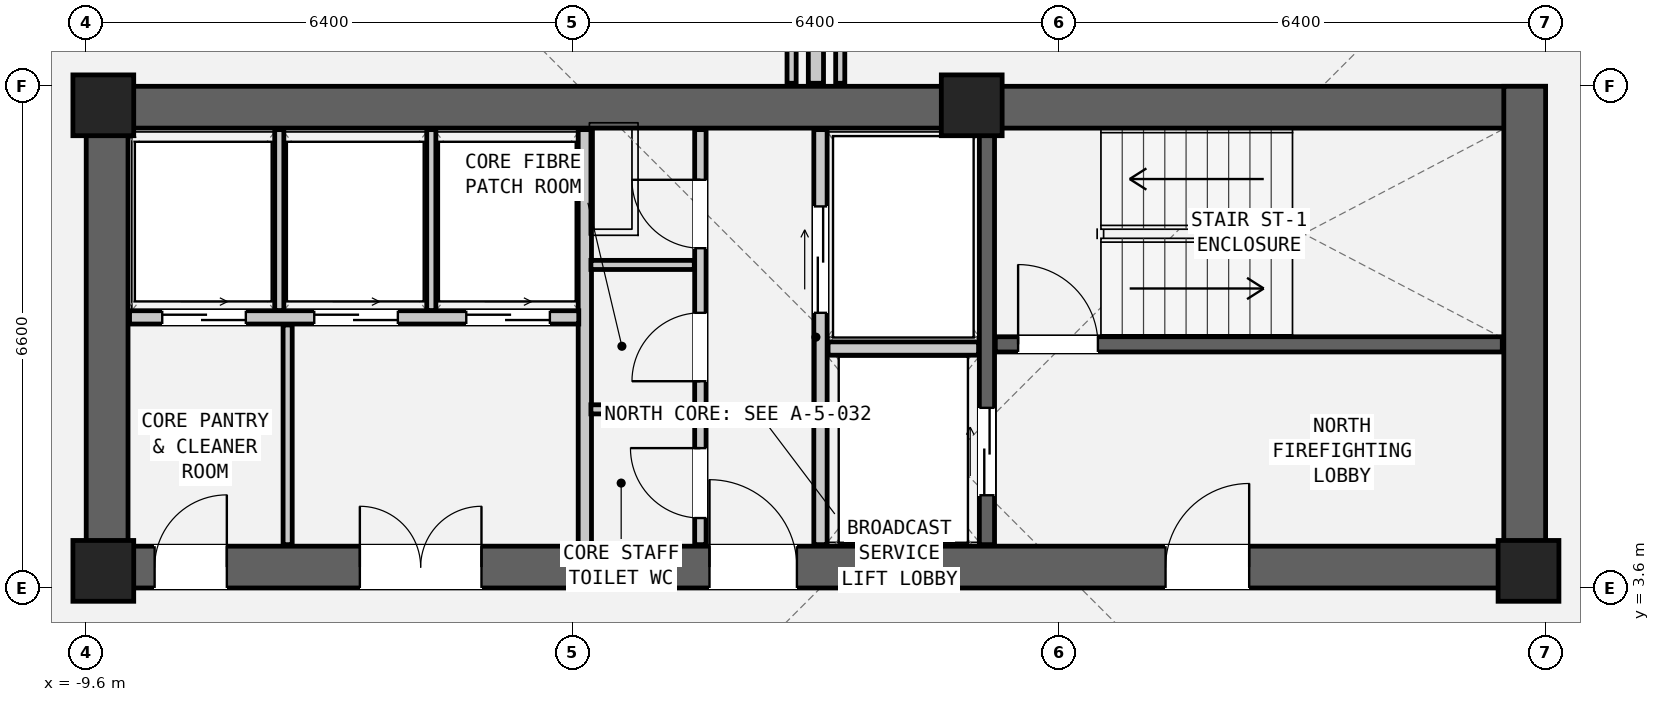
"""IFC4 building model, lengths in metres.
Left out: names, types, materials, properties, quantities, classifications, styles, units other than length and angle.
Written with IfcOpenShell. Run it as: python <this file> out.ifc"""

import sys

from ifc_helpers import new_model, si_unit, direction, frame, frame_2d, origin, origin_2d, place, context, subcontext, project, spatial, rectangle, extrude, element, fill, save


model = new_model("IFC4")
c1 = context("Model", 3, precision=1e-05, world=origin(), true_north=direction((0.0, 1.0)))
c2 = subcontext(c1, "Body", "Model", "MODEL_VIEW")
j1 = project(units=[si_unit("LENGTHUNIT", "METRE"), si_unit("PLANEANGLEUNIT", "RADIAN")], contexts=[c1])
p1 = place(None, origin())
s1 = spatial("IfcSite", under=j1, at=p1, CompositionType="ELEMENT")
p2 = place(p1, origin())
s2 = spatial("IfcBuilding", under=s1, at=p2, CompositionType="ELEMENT")
p3 = place(p2, frame((0.0, 0.0, 101.25)))
s3 = spatial("IfcBuildingStorey", under=s2, at=p3, CompositionType="ELEMENT", Elevation=101.25)
p4 = place(p3, frame((-9.6, 9.925, 0.0), z_axis=(0.0, 0.0, 1.0), x_axis=(1.0, 0.0, 0.0)))
e1 = element("IfcWall", 1, at=p4, inside=s3, PredefinedType="SHEAR", context=c2, shape_type="SweptSolid", body=[
    extrude(rectangle(XDim=19.2, YDim=0.55, at=frame_2d((9.6, 0.0))), origin(), (0.0, 0.0, 1.0), 3.6),
])
p5 = place(p3, frame((-9.6, 3.875, 0.0), z_axis=(0.0, 0.0, 1.0), x_axis=(1.0, 0.0, 0.0)))
e2 = element("IfcWall", 2, at=p5, inside=s3, PredefinedType="SHEAR", context=c2, shape_type="SweptSolid", body=[
    extrude(rectangle(XDim=19.2, YDim=0.55, at=frame_2d((9.6, 0.0))), origin(), (0.0, 0.0, 1.0), 3.6),
])
p6 = place(p5, frame((14.2, 0.0, 0.0)))
e3 = element("IfcOpeningElement", 3, at=p6, cuts=e2, PredefinedType="OPENING", context=c2, shape_type="SweptSolid", body=[
    extrude(rectangle(XDim=1.1, YDim=2.08, at=frame_2d((0.55, 1.04))), frame((0.0, 0.287, 0.0), z_axis=(0.0, -1.0, 0.0), x_axis=(1.0, 0.0, 0.0)), (0.0, 0.0, 1.0), 0.574),
])
p7 = place(p5, frame((8.2, 0.0, 0.0)))
e4 = element("IfcOpeningElement", 4, at=p7, cuts=e2, PredefinedType="OPENING", context=c2, shape_type="SweptSolid", body=[
    extrude(rectangle(XDim=1.15, YDim=2.1, at=frame_2d((0.575, 1.05))), frame((0.0, 0.287, 0.0), z_axis=(0.0, -1.0, 0.0), x_axis=(1.0, 0.0, 0.0)), (0.0, 0.0, 1.0), 0.574),
])
p8 = place(p5, frame((0.9, 0.0, 0.0)))
e5 = element("IfcOpeningElement", 5, at=p8, cuts=e2, PredefinedType="OPENING", context=c2, shape_type="SweptSolid", body=[
    extrude(rectangle(XDim=0.95, YDim=2.1, at=frame_2d((0.475, 1.05))), frame((0.0, 0.287, 0.0), z_axis=(0.0, -1.0, 0.0), x_axis=(1.0, 0.0, 0.0)), (0.0, 0.0, 1.0), 0.574),
])
p9 = place(p5, frame((3.6, 0.0, 0.0)))
e6 = element("IfcOpeningElement", 6, at=p9, cuts=e2, PredefinedType="OPENING", context=c2, shape_type="SweptSolid", body=[
    extrude(rectangle(XDim=1.6, YDim=2.12, at=frame_2d((0.8, 1.06))), frame((0.0, 0.287, 0.0), z_axis=(0.0, -1.0, 0.0), x_axis=(1.0, 0.0, 0.0)), (0.0, 0.0, 1.0), 0.574),
])
for number, where, z_axis, x_axis in (
    (7, (-9.325, 3.6, 0.0), (0.0, 0.0, 1.0), (0.0, 1.0, 0.0)),
    (8, (9.325, 3.6, 0.0), (0.0, 0.0, 1.0), (0.0, 1.0, 0.0)),
):
    element("IfcWall", number, at=place(p3, frame(where, z_axis=z_axis, x_axis=x_axis)), inside=s3, PredefinedType="SHEAR", context=c2, shape_type="SweptSolid", body=[
        extrude(rectangle(XDim=6.6, YDim=0.55, at=frame_2d((3.3, 0.0))), origin(), (0.0, 0.0, 1.0), 3.6),
    ])
for number, where, z_axis, x_axis in (
    (9, (-9.375, 9.95, 0.0), (0.0, 0.0, 1.0), (1.0, 0.0, 0.0)),
    (10, (2.05, 9.95, 0.0), (0.0, 0.0, 1.0), (1.0, 0.0, 0.0)),
    (11, (-9.375, 3.825, 0.0), (0.0, 0.0, 1.0), (1.0, 0.0, 0.0)),
    (12, (9.375, 3.825, 0.0), (0.0, 0.0, 1.0), (1.0, 0.0, 0.0)),
):
    element("IfcColumn", number, at=place(p3, frame(where, z_axis=z_axis, x_axis=x_axis)), inside=s3, PredefinedType="COLUMN", context=c2, shape_type="SweptSolid", body=[
        extrude(rectangle(XDim=0.8, YDim=0.8, at=origin_2d()), origin(), (0.0, 0.0, 1.0), 3.6),
    ])
p10 = place(p3, frame((2.36, 6.805, 0.0), z_axis=(0.0, 0.0, 1.0), x_axis=(1.0, 0.0, 0.0)))
e13 = element("IfcWall", 13, at=p10, inside=s3, PredefinedType="SHEAR", context=c2, shape_type="SweptSolid", body=[
    extrude(rectangle(XDim=6.67, YDim=0.2, at=frame_2d((3.335, 0.0))), origin(), (0.0, 0.0, 1.0), 3.22),
])
p11 = place(p10, frame((0.3, 0.0, 0.0)))
e14 = element("IfcOpeningElement", 14, at=p11, cuts=e13, PredefinedType="OPENING", context=c2, shape_type="SweptSolid", body=[
    extrude(rectangle(XDim=1.05, YDim=2.08, at=frame_2d((0.525, 1.04))), frame((0.0, 0.112, 0.0), z_axis=(0.0, -1.0, 0.0), x_axis=(1.0, 0.0, 0.0)), (0.0, 0.0, 1.0), 0.224),
])
p12 = place(p3, frame((2.25, 4.17, 0.0), z_axis=(0.0, 0.0, 1.0), x_axis=(0.0, 1.0, 0.0)))
e15 = element("IfcWall", 15, at=p12, inside=s3, PredefinedType="SHEAR", context=c2, shape_type="SweptSolid", body=[
    extrude(rectangle(XDim=5.46, YDim=0.2, at=frame_2d((2.73, 0.0))), origin(), (0.0, 0.0, 1.0), 3.22),
])
p13 = place(p12, frame((0.65, 0.0, 0.0)))
e16 = element("IfcOpeningElement", 16, at=p13, cuts=e15, PredefinedType="OPENING", context=c2, shape_type="SweptSolid", body=[
    extrude(rectangle(XDim=1.15, YDim=2.08, at=frame_2d((0.575, 1.04))), frame((0.0, 0.112, 0.0), z_axis=(0.0, -1.0, 0.0), x_axis=(1.0, 0.0, 0.0)), (0.0, 0.0, 1.0), 0.224),
])
p14 = place(p3, frame((0.06, 4.17, 0.0), z_axis=(0.0, 0.0, 1.0), x_axis=(0.0, 1.0, 0.0)))
e17 = element("IfcWall", 17, at=p14, inside=s3, PredefinedType="PARTITIONING", context=c2, shape_type="SweptSolid", body=[
    extrude(rectangle(XDim=5.46, YDim=0.175, at=frame_2d((2.73, 0.0))), origin(), (0.0, 0.0, 1.0), 3.22),
])
p15 = place(p14, frame((3.05, 0.0, 0.0)))
e18 = element("IfcOpeningElement", 18, at=p15, cuts=e17, PredefinedType="OPENING", context=c2, shape_type="SweptSolid", body=[
    extrude(rectangle(XDim=1.4, YDim=2.12, at=frame_2d((0.7, 1.06))), frame((0.0, 0.1, 0.0), z_axis=(0.0, -1.0, 0.0), x_axis=(1.0, 0.0, 0.0)), (0.0, 0.0, 1.0), 0.199),
])
p16 = place(p3, frame((0.16, 6.75, 0.0), z_axis=(0.0, 0.0, 1.0), x_axis=(1.0, 0.0, 0.0)))
e19 = element("IfcWall", 19, at=p16, inside=s3, PredefinedType="PARTITIONING", context=c2, shape_type="SweptSolid", body=[
    extrude(rectangle(XDim=1.98, YDim=0.175, at=frame_2d((0.99, 0.0))), origin(), (0.0, 0.0, 1.0), 3.22),
])
p17 = place(p3, frame((-3.04, 4.17, 0.0), z_axis=(0.0, 0.0, 1.0), x_axis=(0.0, 1.0, 0.0)))
e20 = element("IfcWall", 20, at=p17, inside=s3, PredefinedType="PARTITIONING", context=c2, shape_type="SweptSolid", body=[
    extrude(rectangle(XDim=5.46, YDim=0.175, at=frame_2d((2.73, 0.0))), origin(), (0.0, 0.0, 1.0), 3.22),
])
p18 = place(p3, frame((-1.52, 4.17, 0.0), z_axis=(0.0, 0.0, 1.0), x_axis=(0.0, 1.0, 0.0)))
e21 = element("IfcWall", 21, at=p18, inside=s3, PredefinedType="PARTITIONING", context=c2, shape_type="SweptSolid", body=[
    extrude(rectangle(XDim=5.46, YDim=0.15, at=frame_2d((2.73, 0.0))), origin(), (0.0, 0.0, 1.0), 3.22),
])
p19 = place(p18, frame((3.9, 0.0, 0.0)))
e22 = element("IfcOpeningElement", 22, at=p19, cuts=e21, PredefinedType="OPENING", context=c2, shape_type="SweptSolid", body=[
    extrude(rectangle(XDim=0.9, YDim=2.05, at=frame_2d((0.45, 1.025))), frame((0.0, 0.087, 0.0), z_axis=(0.0, -1.0, 0.0), x_axis=(1.0, 0.0, 0.0)), (0.0, 0.0, 1.0), 0.174),
])
p20 = place(p18, frame((2.15, 0.0, 0.0)))
e23 = element("IfcOpeningElement", 23, at=p20, cuts=e21, PredefinedType="OPENING", context=c2, shape_type="SweptSolid", body=[
    extrude(rectangle(XDim=0.9, YDim=2.05, at=frame_2d((0.45, 1.025))), frame((0.0, 0.087, 0.0), z_axis=(0.0, -1.0, 0.0), x_axis=(1.0, 0.0, 0.0)), (0.0, 0.0, 1.0), 0.174),
])
p21 = place(p18, frame((0.35, 0.0, 0.0)))
e24 = element("IfcOpeningElement", 24, at=p21, cuts=e21, PredefinedType="OPENING", context=c2, shape_type="SweptSolid", body=[
    extrude(rectangle(XDim=0.92, YDim=2.1, at=frame_2d((0.46, 1.05))), frame((0.0, 0.087, 0.0), z_axis=(0.0, -1.0, 0.0), x_axis=(1.0, 0.0, 0.0)), (0.0, 0.0, 1.0), 0.174),
])
for number, where, z_axis, x_axis in (
    (25, (-2.96, 5.95, 0.0), (0.0, 0.0, 1.0), (1.0, 0.0, 0.0)),
    (26, (-2.96, 7.85, 0.0), (0.0, 0.0, 1.0), (1.0, 0.0, 0.0)),
):
    element("IfcWall", number, at=place(p3, frame(where, z_axis=z_axis, x_axis=x_axis)), inside=s3, PredefinedType="PARTITIONING", context=c2, shape_type="SweptSolid", body=[
        extrude(rectangle(XDim=1.36, YDim=0.12, at=frame_2d((0.68, 0.0))), origin(), (0.0, 0.0, 1.0), 3.22),
    ])
p22 = place(p3, frame((-9.03, 7.16, 0.0), z_axis=(0.0, 0.0, 1.0), x_axis=(1.0, 0.0, 0.0)))
e27 = element("IfcWall", 27, at=p22, inside=s3, PredefinedType="PARTITIONING", context=c2, shape_type="SweptSolid", body=[
    extrude(rectangle(XDim=5.91, YDim=0.175, at=frame_2d((2.955, 0.0))), origin(), (0.0, 0.0, 1.0), 3.22),
])
p23 = place(p22, frame((0.43, 0.0, 0.0)))
e28 = element("IfcOpeningElement", 28, at=p23, cuts=e27, PredefinedType="OPENING", context=c2, shape_type="SweptSolid", body=[
    extrude(rectangle(XDim=1.1, YDim=2.06, at=frame_2d((0.55, 1.03))), frame((0.0, 0.1, 0.0), z_axis=(0.0, -1.0, 0.0), x_axis=(1.0, 0.0, 0.0)), (0.0, 0.0, 1.0), 0.199),
])
p24 = place(p22, frame((2.43, 0.0, 0.0)))
e29 = element("IfcOpeningElement", 29, at=p24, cuts=e27, PredefinedType="OPENING", context=c2, shape_type="SweptSolid", body=[
    extrude(rectangle(XDim=1.1, YDim=2.06, at=frame_2d((0.55, 1.03))), frame((0.0, 0.1, 0.0), z_axis=(0.0, -1.0, 0.0), x_axis=(1.0, 0.0, 0.0)), (0.0, 0.0, 1.0), 0.199),
])
p25 = place(p22, frame((4.43, 0.0, 0.0)))
e30 = element("IfcOpeningElement", 30, at=p25, cuts=e27, PredefinedType="OPENING", context=c2, shape_type="SweptSolid", body=[
    extrude(rectangle(XDim=1.1, YDim=2.06, at=frame_2d((0.55, 1.03))), frame((0.0, 0.1, 0.0), z_axis=(0.0, -1.0, 0.0), x_axis=(1.0, 0.0, 0.0)), (0.0, 0.0, 1.0), 0.199),
])
for number, where, z_axis, x_axis in (
    (31, (-7.06, 7.25, 0.0), (0.0, 0.0, 1.0), (0.0, 1.0, 0.0)),
    (32, (-5.06, 7.25, 0.0), (0.0, 0.0, 1.0), (0.0, 1.0, 0.0)),
):
    element("IfcWall", number, at=place(p3, frame(where, z_axis=z_axis, x_axis=x_axis)), inside=s3, PredefinedType="PARTITIONING", context=c2, shape_type="SweptSolid", body=[
        extrude(rectangle(XDim=2.38, YDim=0.12, at=frame_2d((1.19, 0.0))), origin(), (0.0, 0.0, 1.0), 3.22),
    ])
p26 = place(p3, frame((-6.95, 4.17, 0.0), z_axis=(0.0, 0.0, 1.0), x_axis=(0.0, 1.0, 0.0)))
e33 = element("IfcWall", 33, at=p26, inside=s3, PredefinedType="PARTITIONING", context=c2, shape_type="SweptSolid", body=[
    extrude(rectangle(XDim=2.89, YDim=0.12, at=frame_2d((1.445, 0.0))), origin(), (0.0, 0.0, 1.0), 3.22),
])
p27 = place(p3, frame((0.0, 10.24, 0.0), z_axis=(0.0, 0.0, 1.0), x_axis=(0.0, 1.0, 0.0)))
e34 = element("IfcWall", 34, at=p27, inside=s3, PredefinedType="PARTITIONING", context=c2, shape_type="SweptSolid", body=[
    extrude(rectangle(XDim=14.55, YDim=0.2, at=frame_2d((7.275, 0.0))), origin(), (0.0, 0.0, 1.0), 2.741),
])
for number, where, z_axis, x_axis in (
    (35, (-0.32, 10.24, 0.0), (0.0, 0.0, 1.0), (0.0, 1.0, 0.0)),
    (36, (0.32, 10.24, 0.0), (0.0, 0.0, 1.0), (0.0, 1.0, 0.0)),
):
    element("IfcWall", number, at=place(p3, frame(where, z_axis=z_axis, x_axis=x_axis)), inside=s3, PredefinedType="PARTITIONING", context=c2, shape_type="SweptSolid", body=[
        extrude(rectangle(XDim=2.36, YDim=0.12, at=frame_2d((1.18, 0.0))), origin(), (0.0, 0.0, 1.0), 2.741),
    ])
p28 = place(p11, origin())
e37 = element("IfcDoor", 37, at=p28, inside=s3, OperationType="SINGLE_SWING_LEFT", PredefinedType="DOOR", context=c2, shape_type="SweptSolid", body=[
    extrude(rectangle(XDim=1.05, YDim=2.08, at=frame_2d((0.525, 1.04))), frame((0.0, 0.025, 0.0), z_axis=(0.0, -1.0, 0.0), x_axis=(1.0, 0.0, 0.0)), (0.0, 0.0, 1.0), 0.05),
])
fill(e14, e37)
p29 = place(p6, origin())
e38 = element("IfcDoor", 38, at=p29, inside=s3, OperationType="SINGLE_SWING_RIGHT", PredefinedType="DOOR", context=c2, shape_type="SweptSolid", body=[
    extrude(rectangle(XDim=1.1, YDim=2.08, at=frame_2d((0.55, 1.04))), frame((0.0, 0.025, 0.0), z_axis=(0.0, -1.0, 0.0), x_axis=(1.0, 0.0, 0.0)), (0.0, 0.0, 1.0), 0.05),
])
fill(e3, e38)
p30 = place(p13, origin())
e39 = element("IfcDoor", 39, at=p30, inside=s3, OperationType="DOUBLE_DOOR_SLIDING", PredefinedType="DOOR", context=c2, shape_type="SweptSolid", body=[
    extrude(rectangle(XDim=1.15, YDim=2.08, at=frame_2d((0.575, 1.04))), frame((0.0, 0.025, 0.0), z_axis=(0.0, -1.0, 0.0), x_axis=(1.0, 0.0, 0.0)), (0.0, 0.0, 1.0), 0.05),
])
fill(e16, e39)
p31 = place(p15, origin())
e40 = element("IfcDoor", 40, at=p31, inside=s3, OperationType="DOUBLE_DOOR_SLIDING", PredefinedType="DOOR", context=c2, shape_type="SweptSolid", body=[
    extrude(rectangle(XDim=1.4, YDim=2.12, at=frame_2d((0.7, 1.06))), frame((0.0, 0.025, 0.0), z_axis=(0.0, -1.0, 0.0), x_axis=(1.0, 0.0, 0.0)), (0.0, 0.0, 1.0), 0.05),
])
fill(e18, e40)
p32 = place(p7, origin())
e41 = element("IfcDoor", 41, at=p32, inside=s3, OperationType="SINGLE_SWING_LEFT", PredefinedType="DOOR", context=c2, shape_type="SweptSolid", body=[
    extrude(rectangle(XDim=1.15, YDim=2.1, at=frame_2d((0.575, 1.05))), frame((0.0, 0.025, 0.0), z_axis=(0.0, -1.0, 0.0), x_axis=(1.0, 0.0, 0.0)), (0.0, 0.0, 1.0), 0.05),
])
fill(e4, e41)
p33 = place(p19, origin())
e42 = element("IfcDoor", 42, at=p33, inside=s3, OperationType="SINGLE_SWING_RIGHT", PredefinedType="DOOR", context=c2, shape_type="SweptSolid", body=[
    extrude(rectangle(XDim=0.9, YDim=2.05, at=frame_2d((0.45, 1.025))), frame((0.0, 0.025, 0.0), z_axis=(0.0, -1.0, 0.0), x_axis=(1.0, 0.0, 0.0)), (0.0, 0.0, 1.0), 0.05),
])
fill(e22, e42)
p34 = place(p20, origin())
e43 = element("IfcDoor", 43, at=p34, inside=s3, OperationType="SINGLE_SWING_LEFT", PredefinedType="DOOR", context=c2, shape_type="SweptSolid", body=[
    extrude(rectangle(XDim=0.9, YDim=2.05, at=frame_2d((0.45, 1.025))), frame((0.0, 0.025, 0.0), z_axis=(0.0, -1.0, 0.0), x_axis=(1.0, 0.0, 0.0)), (0.0, 0.0, 1.0), 0.05),
])
fill(e23, e43)
p35 = place(p21, origin())
e44 = element("IfcDoor", 44, at=p35, inside=s3, OperationType="SINGLE_SWING_RIGHT", PredefinedType="DOOR", context=c2, shape_type="SweptSolid", body=[
    extrude(rectangle(XDim=0.92, YDim=2.1, at=frame_2d((0.46, 1.05))), frame((0.0, 0.025, 0.0), z_axis=(0.0, -1.0, 0.0), x_axis=(1.0, 0.0, 0.0)), (0.0, 0.0, 1.0), 0.05),
])
fill(e24, e44)
p36 = place(p23, origin())
e45 = element("IfcDoor", 45, at=p36, inside=s3, OperationType="DOUBLE_DOOR_SLIDING", PredefinedType="DOOR", context=c2, shape_type="SweptSolid", body=[
    extrude(rectangle(XDim=1.1, YDim=2.06, at=frame_2d((0.55, 1.03))), frame((0.0, 0.025, 0.0), z_axis=(0.0, -1.0, 0.0), x_axis=(1.0, 0.0, 0.0)), (0.0, 0.0, 1.0), 0.05),
])
fill(e28, e45)
p37 = place(p24, origin())
e46 = element("IfcDoor", 46, at=p37, inside=s3, OperationType="DOUBLE_DOOR_SLIDING", PredefinedType="DOOR", context=c2, shape_type="SweptSolid", body=[
    extrude(rectangle(XDim=1.1, YDim=2.06, at=frame_2d((0.55, 1.03))), frame((0.0, 0.025, 0.0), z_axis=(0.0, -1.0, 0.0), x_axis=(1.0, 0.0, 0.0)), (0.0, 0.0, 1.0), 0.05),
])
fill(e29, e46)
p38 = place(p25, origin())
e47 = element("IfcDoor", 47, at=p38, inside=s3, OperationType="DOUBLE_DOOR_SLIDING", PredefinedType="DOOR", context=c2, shape_type="SweptSolid", body=[
    extrude(rectangle(XDim=1.1, YDim=2.06, at=frame_2d((0.55, 1.03))), frame((0.0, 0.025, 0.0), z_axis=(0.0, -1.0, 0.0), x_axis=(1.0, 0.0, 0.0)), (0.0, 0.0, 1.0), 0.05),
])
fill(e30, e47)
p39 = place(p8, origin())
e48 = element("IfcDoor", 48, at=p39, inside=s3, OperationType="SINGLE_SWING_RIGHT", PredefinedType="DOOR", context=c2, shape_type="SweptSolid", body=[
    extrude(rectangle(XDim=0.95, YDim=2.1, at=frame_2d((0.475, 1.05))), frame((0.0, 0.025, 0.0), z_axis=(0.0, -1.0, 0.0), x_axis=(1.0, 0.0, 0.0)), (0.0, 0.0, 1.0), 0.05),
])
fill(e5, e48)
p40 = place(p9, origin())
e49 = element("IfcDoor", 49, at=p40, inside=s3, OperationType="DOUBLE_DOOR_SINGLE_SWING", PredefinedType="DOOR", context=c2, shape_type="SweptSolid", body=[
    extrude(rectangle(XDim=1.6, YDim=2.12, at=frame_2d((0.8, 1.06))), frame((0.0, 0.025, 0.0), z_axis=(0.0, -1.0, 0.0), x_axis=(1.0, 0.0, 0.0)), (0.0, 0.0, 1.0), 0.05),
])
fill(e6, e49)
save(model, sys.argv[1])
